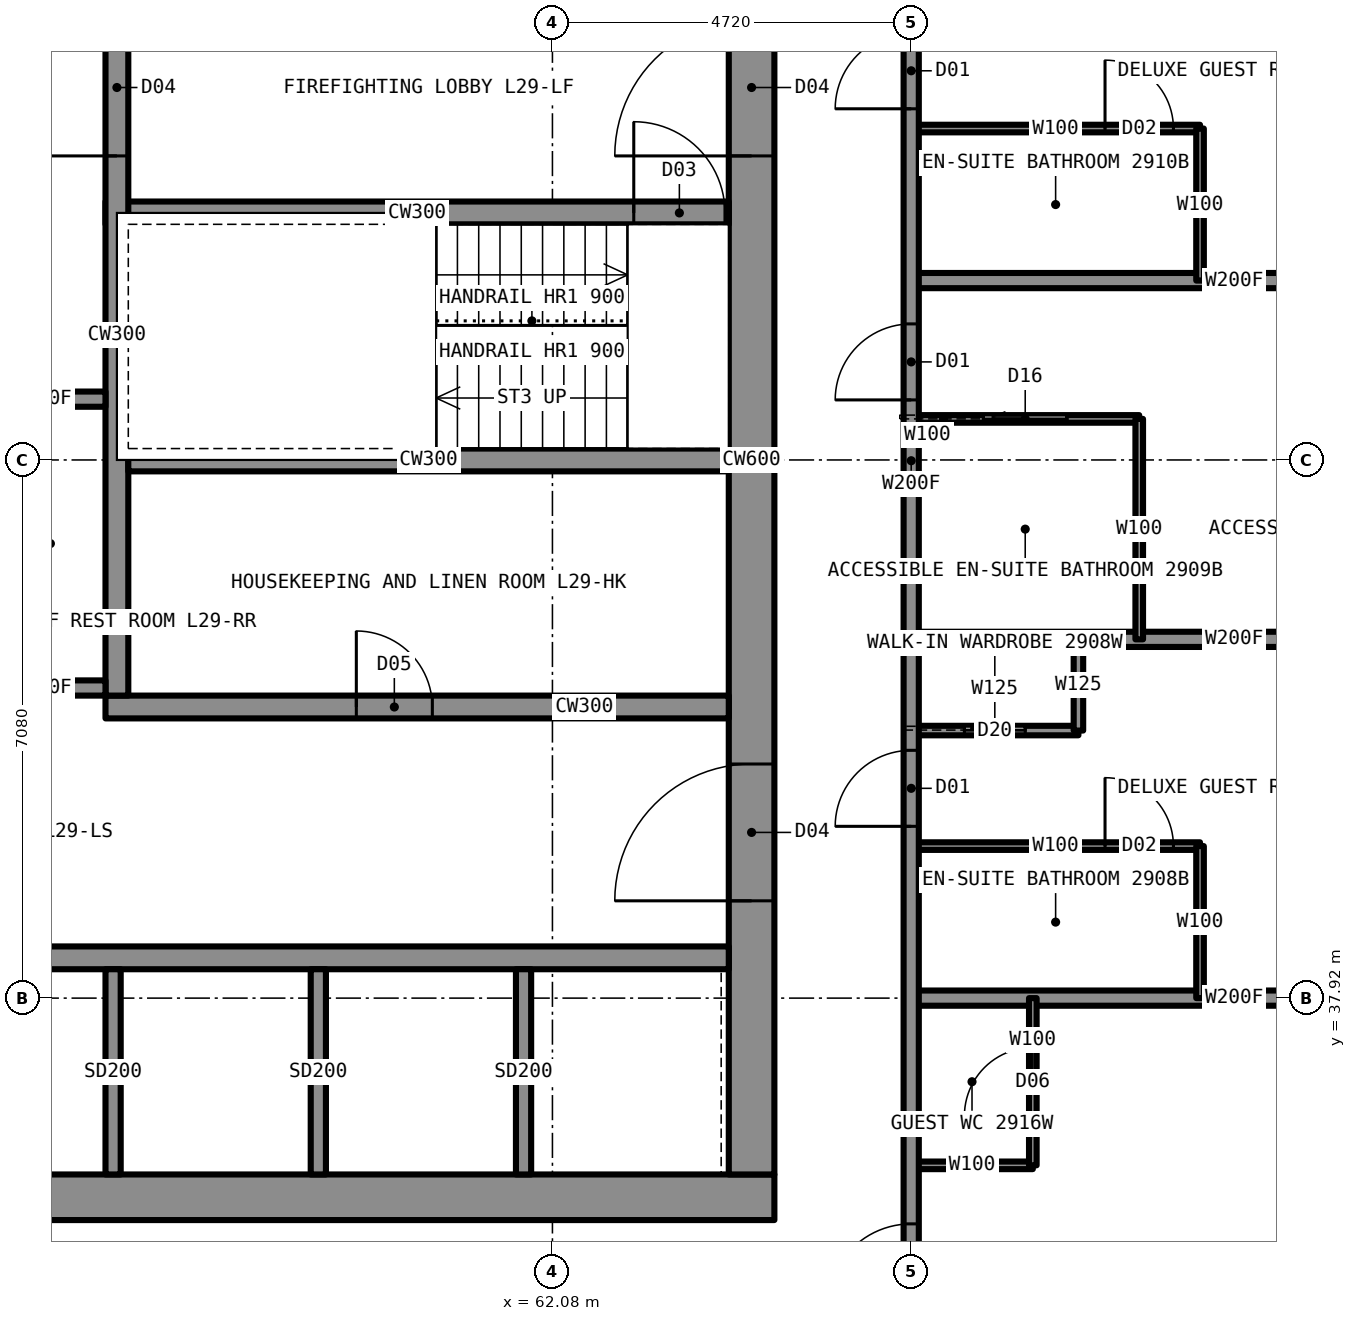
"""IFC4 building model, lengths in metres.
Left out: names, types, materials, properties, quantities, classifications, styles, units other than length and angle.
Written with IfcOpenShell. Run it as: python <this file> out.ifc"""

import sys

from ifc_helpers import new_model, si_unit, direction, frame, frame_2d, origin, place, context, subcontext, project, spatial, rectangle, extrude, element, fill, save


model = new_model("IFC4")
c1 = context("Model", 3, precision=1e-05, world=origin(), true_north=direction((0.0, 1.0)))
c2 = subcontext(c1, "Body", "Model", "MODEL_VIEW")
j1 = project(units=[si_unit("LENGTHUNIT", "METRE"), si_unit("PLANEANGLEUNIT", "RADIAN")], contexts=[c1])
p1 = place(None, origin())
s1 = spatial("IfcSite", under=j1, at=p1, CompositionType="ELEMENT")
p2 = place(p1, origin())
s2 = spatial("IfcBuilding", under=s1, at=p2, CompositionType="ELEMENT")
p3 = place(p2, frame((0.0, 0.0, 103.9)))
s3 = spatial("IfcBuildingStorey", under=s2, at=p3, CompositionType="ELEMENT", Elevation=103.9)
p4 = place(p3, frame((45.0, 35.3, 0.0), z_axis=(0.0, 0.0, 1.0), x_axis=(1.0, 0.0, 0.0)))
e1 = element("IfcWall", 1, at=p4, inside=s3, PredefinedType="SHEAR", context=c2, shape_type="SweptSolid", body=[
    extrude(rectangle(XDim=20.0, YDim=0.6, at=frame_2d((10.0, 0.0))), origin(), (0.0, 0.0, 1.0), 3.5),
])
p5 = place(p3, frame((64.7, 35.6, 0.0), z_axis=(0.0, 0.0, 1.0), x_axis=(0.0, 1.0, 0.0)))
e2 = element("IfcWall", 2, at=p5, inside=s3, PredefinedType="SHEAR", context=c2, shape_type="SweptSolid", body=[
    extrude(rectangle(XDim=18.8, YDim=0.6, at=frame_2d((9.4, 0.0))), origin(), (0.0, 0.0, 1.0), 3.5),
])
p6 = place(p5, frame((13.4, 0.0, 0.0)))
e3 = element("IfcOpeningElement", 3, at=p6, cuts=e2, PredefinedType="OPENING", context=c2, shape_type="SweptSolid", body=[
    extrude(rectangle(XDim=1.8, YDim=2.2, at=frame_2d((0.9, 1.1))), frame((0.0, 0.31, 0.0), z_axis=(0.0, -1.0, 0.0), x_axis=(1.0, 0.0, 0.0)), (0.0, 0.0, 1.0), 0.62),
])
p7 = place(p5, frame((3.6, 0.0, 0.0)))
e4 = element("IfcOpeningElement", 4, at=p7, cuts=e2, PredefinedType="OPENING", context=c2, shape_type="SweptSolid", body=[
    extrude(rectangle(XDim=1.8, YDim=2.2, at=frame_2d((0.9, 1.1))), frame((0.0, 0.31, 0.0), z_axis=(0.0, -1.0, 0.0), x_axis=(1.0, 0.0, 0.0)), (0.0, 0.0, 1.0), 0.62),
])
p8 = place(p3, frame((45.6, 38.45, 0.0), z_axis=(0.0, 0.0, 1.0), x_axis=(1.0, 0.0, 0.0)))
e5 = element("IfcWall", 5, at=p8, inside=s3, PredefinedType="SHEAR", context=c2, shape_type="SweptSolid", body=[
    extrude(rectangle(XDim=18.8, YDim=0.3, at=frame_2d((9.4, 0.0))), origin(), (0.0, 0.0, 1.0), 3.5),
])
p9 = place(p3, frame((56.2, 48.25, 0.0), z_axis=(0.0, 0.0, 1.0), x_axis=(1.0, 0.0, 0.0)))
e6 = element("IfcWall", 6, at=p9, inside=s3, PredefinedType="SHEAR", context=c2, shape_type="SweptSolid", body=[
    extrude(rectangle(XDim=8.2, YDim=0.3, at=frame_2d((4.1, 0.0))), origin(), (0.0, 0.0, 1.0), 3.5),
])
p10 = place(p9, frame((6.95, 0.0, 0.0)))
e7 = element("IfcOpeningElement", 7, at=p10, cuts=e6, PredefinedType="OPENING", context=c2, shape_type="SweptSolid", body=[
    extrude(rectangle(XDim=1.2, YDim=2.2, at=frame_2d((0.6, 1.1))), frame((0.0, 0.16, 0.0), z_axis=(0.0, -1.0, 0.0), x_axis=(1.0, 0.0, 0.0)), (0.0, 0.0, 1.0), 0.32),
])
p11 = place(p3, frame((56.2, 41.75, 0.0), z_axis=(0.0, 0.0, 1.0), x_axis=(1.0, 0.0, 0.0)))
e8 = element("IfcWall", 8, at=p11, inside=s3, PredefinedType="SHEAR", context=c2, shape_type="SweptSolid", body=[
    extrude(rectangle(XDim=8.2, YDim=0.3, at=frame_2d((4.1, 0.0))), origin(), (0.0, 0.0, 1.0), 3.5),
])
p12 = place(p11, frame((3.3, 0.0, 0.0)))
e9 = element("IfcOpeningElement", 9, at=p12, cuts=e8, PredefinedType="OPENING", context=c2, shape_type="SweptSolid", body=[
    extrude(rectangle(XDim=1.0, YDim=2.1, at=frame_2d((0.5, 1.05))), frame((0.0, 0.16, 0.0), z_axis=(0.0, -1.0, 0.0), x_axis=(1.0, 0.0, 0.0)), (0.0, 0.0, 1.0), 0.32),
])
p13 = place(p3, frame((56.35, 41.9, 0.0), z_axis=(0.0, 0.0, 1.0), x_axis=(0.0, 1.0, 0.0)))
e10 = element("IfcWall", 10, at=p13, inside=s3, PredefinedType="SHEAR", context=c2, shape_type="SweptSolid", body=[
    extrude(rectangle(XDim=9.5, YDim=0.3, at=frame_2d((4.75, 0.0))), origin(), (0.0, 0.0, 1.0), 3.5),
])
p14 = place(p13, frame((7.1, 0.0, 0.0)))
e11 = element("IfcOpeningElement", 11, at=p14, cuts=e10, PredefinedType="OPENING", context=c2, shape_type="SweptSolid", body=[
    extrude(rectangle(XDim=1.8, YDim=2.2, at=frame_2d((0.9, 1.1))), frame((0.0, 0.16, 0.0), z_axis=(0.0, -1.0, 0.0), x_axis=(1.0, 0.0, 0.0)), (0.0, 0.0, 1.0), 0.32),
])
p15 = place(p3, frame((56.5, 45.0, 0.0), z_axis=(0.0, 0.0, 1.0), x_axis=(1.0, 0.0, 0.0)))
e12 = element("IfcWall", 12, at=p15, inside=s3, PredefinedType="SHEAR", context=c2, shape_type="SweptSolid", body=[
    extrude(rectangle(XDim=7.9, YDim=0.3, at=frame_2d((3.95, 0.0))), origin(), (0.0, 0.0, 1.0), 3.5),
])
p16 = place(p3, frame((66.8, 42.64, 0.0), z_axis=(0.0, 0.0, 1.0), x_axis=(1.0, 0.0, 0.0)))
e13 = element("IfcWall", 13, at=p16, inside=s3, PredefinedType="PARTITIONING", context=c2, shape_type="SweptSolid", body=[
    extrude(rectangle(XDim=8.5, YDim=0.2, at=frame_2d((4.25, 0.0))), origin(), (0.0, 0.0, 1.0), 2.731),
])
p17 = place(p3, frame((66.8, 41.44, 0.0), z_axis=(0.0, 0.0, 1.0), x_axis=(1.0, 0.0, 0.0)))
e14 = element("IfcWall", 14, at=p17, inside=s3, PredefinedType="PARTITIONING", context=c2, shape_type="SweptSolid", body=[
    extrude(rectangle(XDim=2.2, YDim=0.125, at=frame_2d((1.1, 0.0))), origin(), (0.0, 0.0, 1.0), 3.33),
])
p18 = place(p17, frame((0.7, 0.0, 0.0)))
e15 = element("IfcOpeningElement", 15, at=p18, cuts=e14, PredefinedType="OPENING", context=c2, shape_type="SweptSolid", body=[
    extrude(rectangle(XDim=0.8, YDim=2.1, at=frame_2d((0.4, 1.05))), frame((0.0, 0.073, 0.0), z_axis=(0.0, -1.0, 0.0), x_axis=(1.0, 0.0, 0.0)), (0.0, 0.0, 1.0), 0.145),
])
p19 = place(p3, frame((66.8, 39.92, 0.0), z_axis=(0.0, 0.0, 1.0), x_axis=(1.0, 0.0, 0.0)))
e16 = element("IfcWall", 16, at=p19, inside=s3, PredefinedType="PARTITIONING", context=c2, shape_type="SweptSolid", body=[
    extrude(rectangle(XDim=3.8, YDim=0.1, at=frame_2d((1.9, 0.0))), origin(), (0.0, 0.0, 1.0), 3.33),
])
p20 = place(p19, frame((2.55, 0.0, 0.0)))
e17 = element("IfcOpeningElement", 17, at=p20, cuts=e16, PredefinedType="OPENING", context=c2, shape_type="SweptSolid", body=[
    extrude(rectangle(XDim=0.9, YDim=2.1, at=frame_2d((0.45, 1.05))), frame((0.0, 0.06, 0.0), z_axis=(0.0, -1.0, 0.0), x_axis=(1.0, 0.0, 0.0)), (0.0, 0.0, 1.0), 0.12),
])
p21 = place(p3, frame((66.8, 37.92, 0.0), z_axis=(0.0, 0.0, 1.0), x_axis=(1.0, 0.0, 0.0)))
e18 = element("IfcWall", 18, at=p21, inside=s3, PredefinedType="PARTITIONING", context=c2, shape_type="SweptSolid", body=[
    extrude(rectangle(XDim=8.5, YDim=0.2, at=frame_2d((4.25, 0.0))), origin(), (0.0, 0.0, 1.0), 2.573),
])
p22 = place(p3, frame((66.8, 35.72, 0.0), z_axis=(0.0, 0.0, 1.0), x_axis=(1.0, 0.0, 0.0)))
e19 = element("IfcWall", 19, at=p22, inside=s3, PredefinedType="PARTITIONING", context=c2, shape_type="SweptSolid", body=[
    extrude(rectangle(XDim=1.6, YDim=0.1, at=frame_2d((0.8, 0.0))), origin(), (0.0, 0.0, 1.0), 3.33),
])
p23 = place(p3, frame((66.8, 45.54, 0.0), z_axis=(0.0, 0.0, 1.0), x_axis=(1.0, 0.0, 0.0)))
e20 = element("IfcWall", 20, at=p23, inside=s3, PredefinedType="PARTITIONING", context=c2, shape_type="SweptSolid", body=[
    extrude(rectangle(XDim=3.0, YDim=0.1, at=frame_2d((1.5, 0.0))), origin(), (0.0, 0.0, 1.0), 3.33),
])
p24 = place(p23, frame((0.95, 0.0, 0.0)))
e21 = element("IfcOpeningElement", 21, at=p24, cuts=e20, PredefinedType="OPENING", context=c2, shape_type="SweptSolid", body=[
    extrude(rectangle(XDim=1.1, YDim=2.1, at=frame_2d((0.55, 1.05))), frame((0.0, 0.06, 0.0), z_axis=(0.0, -1.0, 0.0), x_axis=(1.0, 0.0, 0.0)), (0.0, 0.0, 1.0), 0.12),
])
p25 = place(p3, frame((66.8, 47.36, 0.0), z_axis=(0.0, 0.0, 1.0), x_axis=(1.0, 0.0, 0.0)))
e22 = element("IfcWall", 22, at=p25, inside=s3, PredefinedType="PARTITIONING", context=c2, shape_type="SweptSolid", body=[
    extrude(rectangle(XDim=8.5, YDim=0.2, at=frame_2d((4.25, 0.0))), origin(), (0.0, 0.0, 1.0), 2.731),
])
p26 = place(p3, frame((66.8, 49.36, 0.0), z_axis=(0.0, 0.0, 1.0), x_axis=(1.0, 0.0, 0.0)))
e23 = element("IfcWall", 23, at=p26, inside=s3, PredefinedType="PARTITIONING", context=c2, shape_type="SweptSolid", body=[
    extrude(rectangle(XDim=3.8, YDim=0.1, at=frame_2d((1.9, 0.0))), origin(), (0.0, 0.0, 1.0), 3.33),
])
p27 = place(p26, frame((2.55, 0.0, 0.0)))
e24 = element("IfcOpeningElement", 24, at=p27, cuts=e23, PredefinedType="OPENING", context=c2, shape_type="SweptSolid", body=[
    extrude(rectangle(XDim=0.9, YDim=2.1, at=frame_2d((0.45, 1.05))), frame((0.0, 0.06, 0.0), z_axis=(0.0, -1.0, 0.0), x_axis=(1.0, 0.0, 0.0)), (0.0, 0.0, 1.0), 0.12),
])
p28 = place(p3, frame((66.8, 33.2, 0.0), z_axis=(0.0, 0.0, 1.0), x_axis=(0.0, 1.0, 0.0)))
e25 = element("IfcWall", 25, at=p28, inside=s3, PredefinedType="PARTITIONING", context=c2, shape_type="SweptSolid", body=[
    extrude(rectangle(XDim=23.58, YDim=0.2, at=frame_2d((11.79, 0.0))), origin(), (0.0, 0.0, 1.0), 3.33),
])
p29 = place(p28, frame((6.98, 0.0, 0.0)))
e26 = element("IfcOpeningElement", 26, at=p29, cuts=e25, PredefinedType="OPENING", context=c2, shape_type="SweptSolid", body=[
    extrude(rectangle(XDim=1.0, YDim=2.2, at=frame_2d((0.5, 1.1))), frame((0.0, 0.11, 0.0), z_axis=(0.0, -1.0, 0.0), x_axis=(1.0, 0.0, 0.0)), (0.0, 0.0, 1.0), 0.22),
])
p30 = place(p28, frame((12.59, 0.0, 0.0)))
e27 = element("IfcOpeningElement", 27, at=p30, cuts=e25, PredefinedType="OPENING", context=c2, shape_type="SweptSolid", body=[
    extrude(rectangle(XDim=1.0, YDim=2.2, at=frame_2d((0.5, 1.1))), frame((0.0, 0.11, 0.0), z_axis=(0.0, -1.0, 0.0), x_axis=(1.0, 0.0, 0.0)), (0.0, 0.0, 1.0), 0.22),
])
p31 = place(p28, frame((16.42, 0.0, 0.0)))
e28 = element("IfcOpeningElement", 28, at=p31, cuts=e25, PredefinedType="OPENING", context=c2, shape_type="SweptSolid", body=[
    extrude(rectangle(XDim=1.0, YDim=2.2, at=frame_2d((0.5, 1.1))), frame((0.0, 0.11, 0.0), z_axis=(0.0, -1.0, 0.0), x_axis=(1.0, 0.0, 0.0)), (0.0, 0.0, 1.0), 0.22),
])
p32 = place(p28, frame((21.85, 0.0, 0.0)))
e29 = element("IfcOpeningElement", 29, at=p32, cuts=e25, PredefinedType="OPENING", context=c2, shape_type="SweptSolid", body=[
    extrude(rectangle(XDim=1.1, YDim=2.2, at=frame_2d((0.55, 1.1))), frame((0.0, 0.11, 0.0), z_axis=(0.0, -1.0, 0.0), x_axis=(1.0, 0.0, 0.0)), (0.0, 0.0, 1.0), 0.22),
])
p33 = place(p28, frame((0.65, 0.0, 0.0)))
e30 = element("IfcOpeningElement", 30, at=p33, cuts=e25, PredefinedType="OPENING", context=c2, shape_type="SweptSolid", body=[
    extrude(rectangle(XDim=1.1, YDim=2.2, at=frame_2d((0.55, 1.1))), frame((0.0, 0.11, 0.0), z_axis=(0.0, -1.0, 0.0), x_axis=(1.0, 0.0, 0.0)), (0.0, 0.0, 1.0), 0.22),
])
p34 = place(p3, frame((68.4, 35.72, 0.0), z_axis=(0.0, 0.0, 1.0), x_axis=(0.0, 1.0, 0.0)))
e31 = element("IfcWall", 31, at=p34, inside=s3, PredefinedType="PARTITIONING", context=c2, shape_type="SweptSolid", body=[
    extrude(rectangle(XDim=2.2, YDim=0.1, at=frame_2d((1.1, 0.0))), origin(), (0.0, 0.0, 1.0), 3.33),
])
p35 = place(p34, frame((0.65, 0.0, 0.0)))
e32 = element("IfcOpeningElement", 32, at=p35, cuts=e31, PredefinedType="OPENING", context=c2, shape_type="SweptSolid", body=[
    extrude(rectangle(XDim=0.9, YDim=2.1, at=frame_2d((0.45, 1.05))), frame((0.0, 0.06, 0.0), z_axis=(0.0, -1.0, 0.0), x_axis=(1.0, 0.0, 0.0)), (0.0, 0.0, 1.0), 0.12),
])
p36 = place(p3, frame((69.0, 41.44, 0.0), z_axis=(0.0, 0.0, 1.0), x_axis=(0.0, 1.0, 0.0)))
e33 = element("IfcWall", 33, at=p36, inside=s3, PredefinedType="PARTITIONING", context=c2, shape_type="SweptSolid", body=[
    extrude(rectangle(XDim=1.2, YDim=0.125, at=frame_2d((0.6, 0.0))), origin(), (0.0, 0.0, 1.0), 3.33),
])
p37 = place(p3, frame((69.8, 42.64, 0.0), z_axis=(0.0, 0.0, 1.0), x_axis=(0.0, 1.0, 0.0)))
e34 = element("IfcWall", 34, at=p37, inside=s3, PredefinedType="PARTITIONING", context=c2, shape_type="SweptSolid", body=[
    extrude(rectangle(XDim=2.9, YDim=0.1, at=frame_2d((1.45, 0.0))), origin(), (0.0, 0.0, 1.0), 3.33),
])
for number, where, z_axis, x_axis in (
    (35, (70.6, 37.92, 0.0), (0.0, 0.0, 1.0), (0.0, 1.0, 0.0)),
    (36, (70.6, 47.36, 0.0), (0.0, 0.0, 1.0), (0.0, 1.0, 0.0)),
):
    element("IfcWall", number, at=place(p3, frame(where, z_axis=z_axis, x_axis=x_axis)), inside=s3, PredefinedType="PARTITIONING", context=c2, shape_type="SweptSolid", body=[
        extrude(rectangle(XDim=2.0, YDim=0.1, at=frame_2d((1.0, 0.0))), origin(), (0.0, 0.0, 1.0), 3.33),
    ])
for number, where, z_axis, x_axis in (
    (37, (56.3, 35.6, 0.0), (0.0, 0.0, 1.0), (0.0, 1.0, 0.0)),
    (38, (59.0, 35.6, 0.0), (0.0, 0.0, 1.0), (0.0, 1.0, 0.0)),
    (39, (61.7, 35.6, 0.0), (0.0, 0.0, 1.0), (0.0, 1.0, 0.0)),
):
    element("IfcWall", number, at=place(p3, frame(where, z_axis=z_axis, x_axis=x_axis)), inside=s3, PredefinedType="PARTITIONING", context=c2, shape_type="SweptSolid", body=[
        extrude(rectangle(XDim=2.7, YDim=0.2, at=frame_2d((1.35, 0.0))), origin(), (0.0, 0.0, 1.0), 3.33),
    ])
p38 = place(p29, origin())
e40 = element("IfcDoor", 40, at=p38, inside=s3, OperationType="SINGLE_SWING_LEFT", PredefinedType="DOOR", context=c2, shape_type="SweptSolid", body=[
    extrude(rectangle(XDim=1.0, YDim=2.2, at=frame_2d((0.5, 1.1))), frame((0.0, 0.025, 0.0), z_axis=(0.0, -1.0, 0.0), x_axis=(1.0, 0.0, 0.0)), (0.0, 0.0, 1.0), 0.05),
])
fill(e26, e40)
p39 = place(p20, origin())
e41 = element("IfcDoor", 41, at=p39, inside=s3, OperationType="SINGLE_SWING_RIGHT", PredefinedType="DOOR", context=c2, shape_type="SweptSolid", body=[
    extrude(rectangle(XDim=0.9, YDim=2.1, at=frame_2d((0.45, 1.05))), frame((0.0, 0.025, 0.0), z_axis=(0.0, -1.0, 0.0), x_axis=(1.0, 0.0, 0.0)), (0.0, 0.0, 1.0), 0.05),
])
fill(e17, e41)
p40 = place(p18, origin())
e42 = element("IfcDoor", 42, at=p40, inside=s3, OperationType="SLIDING_TO_LEFT", PredefinedType="DOOR", context=c2, shape_type="SweptSolid", body=[
    extrude(rectangle(XDim=0.8, YDim=2.1, at=frame_2d((0.4, 1.05))), frame((0.0, 0.025, 0.0), z_axis=(0.0, -1.0, 0.0), x_axis=(1.0, 0.0, 0.0)), (0.0, 0.0, 1.0), 0.05),
])
fill(e15, e42)
p41 = place(p30, origin())
e43 = element("IfcDoor", 43, at=p41, inside=s3, OperationType="SINGLE_SWING_LEFT", PredefinedType="DOOR", context=c2, shape_type="SweptSolid", body=[
    extrude(rectangle(XDim=1.0, YDim=2.2, at=frame_2d((0.5, 1.1))), frame((0.0, 0.025, 0.0), z_axis=(0.0, -1.0, 0.0), x_axis=(1.0, 0.0, 0.0)), (0.0, 0.0, 1.0), 0.05),
])
fill(e27, e43)
p42 = place(p24, origin())
e44 = element("IfcDoor", 44, at=p42, inside=s3, OperationType="SLIDING_TO_LEFT", PredefinedType="DOOR", context=c2, shape_type="SweptSolid", body=[
    extrude(rectangle(XDim=1.1, YDim=2.1, at=frame_2d((0.55, 1.05))), frame((0.0, 0.025, 0.0), z_axis=(0.0, -1.0, 0.0), x_axis=(1.0, 0.0, 0.0)), (0.0, 0.0, 1.0), 0.05),
])
fill(e21, e44)
p43 = place(p31, origin())
e45 = element("IfcDoor", 45, at=p43, inside=s3, OperationType="SINGLE_SWING_LEFT", PredefinedType="DOOR", context=c2, shape_type="SweptSolid", body=[
    extrude(rectangle(XDim=1.0, YDim=2.2, at=frame_2d((0.5, 1.1))), frame((0.0, 0.025, 0.0), z_axis=(0.0, -1.0, 0.0), x_axis=(1.0, 0.0, 0.0)), (0.0, 0.0, 1.0), 0.05),
])
fill(e28, e45)
p44 = place(p27, origin())
e46 = element("IfcDoor", 46, at=p44, inside=s3, OperationType="SINGLE_SWING_RIGHT", PredefinedType="DOOR", context=c2, shape_type="SweptSolid", body=[
    extrude(rectangle(XDim=0.9, YDim=2.1, at=frame_2d((0.45, 1.05))), frame((0.0, 0.025, 0.0), z_axis=(0.0, -1.0, 0.0), x_axis=(1.0, 0.0, 0.0)), (0.0, 0.0, 1.0), 0.05),
])
fill(e24, e46)
p45 = place(p33, origin())
e47 = element("IfcDoor", 47, at=p45, inside=s3, OperationType="SINGLE_SWING_LEFT", PredefinedType="DOOR", context=c2, shape_type="SweptSolid", body=[
    extrude(rectangle(XDim=1.1, YDim=2.2, at=frame_2d((0.55, 1.1))), frame((0.0, 0.025, 0.0), z_axis=(0.0, -1.0, 0.0), x_axis=(1.0, 0.0, 0.0)), (0.0, 0.0, 1.0), 0.05),
])
fill(e30, e47)
p46 = place(p35, origin())
e48 = element("IfcDoor", 48, at=p46, inside=s3, OperationType="SINGLE_SWING_LEFT", PredefinedType="DOOR", context=c2, shape_type="SweptSolid", body=[
    extrude(rectangle(XDim=0.9, YDim=2.1, at=frame_2d((0.45, 1.05))), frame((0.0, 0.025, 0.0), z_axis=(0.0, -1.0, 0.0), x_axis=(1.0, 0.0, 0.0)), (0.0, 0.0, 1.0), 0.05),
])
fill(e32, e48)
p47 = place(p6, origin())
e49 = element("IfcDoor", 49, at=p47, inside=s3, OperationType="DOUBLE_DOOR_SINGLE_SWING", PredefinedType="DOOR", context=c2, shape_type="SweptSolid", body=[
    extrude(rectangle(XDim=1.8, YDim=2.2, at=frame_2d((0.9, 1.1))), frame((0.0, 0.025, 0.0), z_axis=(0.0, -1.0, 0.0), x_axis=(1.0, 0.0, 0.0)), (0.0, 0.0, 1.0), 0.05),
])
fill(e3, e49)
p48 = place(p7, origin())
e50 = element("IfcDoor", 50, at=p48, inside=s3, OperationType="DOUBLE_DOOR_SINGLE_SWING", PredefinedType="DOOR", context=c2, shape_type="SweptSolid", body=[
    extrude(rectangle(XDim=1.8, YDim=2.2, at=frame_2d((0.9, 1.1))), frame((0.0, 0.025, 0.0), z_axis=(0.0, -1.0, 0.0), x_axis=(1.0, 0.0, 0.0)), (0.0, 0.0, 1.0), 0.05),
])
fill(e4, e50)
p49 = place(p14, origin())
e51 = element("IfcDoor", 51, at=p49, inside=s3, OperationType="DOUBLE_DOOR_SINGLE_SWING", PredefinedType="DOOR", context=c2, shape_type="SweptSolid", body=[
    extrude(rectangle(XDim=1.8, YDim=2.2, at=frame_2d((0.9, 1.1))), frame((0.0, 0.025, 0.0), z_axis=(0.0, -1.0, 0.0), x_axis=(1.0, 0.0, 0.0)), (0.0, 0.0, 1.0), 0.05),
])
fill(e11, e51)
p50 = place(p10, origin())
e52 = element("IfcDoor", 52, at=p50, inside=s3, OperationType="SINGLE_SWING_LEFT", PredefinedType="DOOR", context=c2, shape_type="SweptSolid", body=[
    extrude(rectangle(XDim=1.2, YDim=2.2, at=frame_2d((0.6, 1.1))), frame((0.0, 0.025, 0.0), z_axis=(0.0, -1.0, 0.0), x_axis=(1.0, 0.0, 0.0)), (0.0, 0.0, 1.0), 0.05),
])
fill(e7, e52)
p51 = place(p12, origin())
e53 = element("IfcDoor", 53, at=p51, inside=s3, OperationType="SINGLE_SWING_LEFT", PredefinedType="DOOR", context=c2, shape_type="SweptSolid", body=[
    extrude(rectangle(XDim=1.0, YDim=2.1, at=frame_2d((0.5, 1.05))), frame((0.0, 0.025, 0.0), z_axis=(0.0, -1.0, 0.0), x_axis=(1.0, 0.0, 0.0)), (0.0, 0.0, 1.0), 0.05),
])
fill(e9, e53)
save(model, sys.argv[1])
